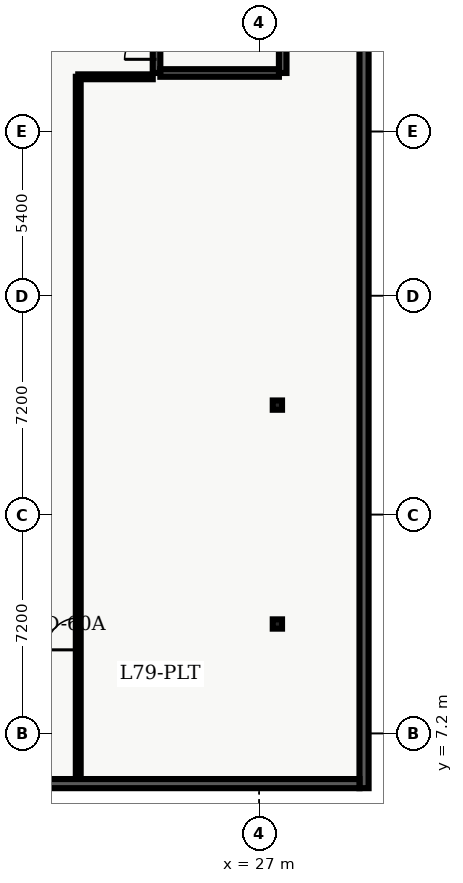
"""IFC4 building model, lengths in metres.
Left out: names, types, materials, properties, quantities, classifications, styles, units other than length and angle.
Written with IfcOpenShell. Run it as: python <this file> out.ifc"""

import sys

from ifc_helpers import new_model, entity, si_unit, converted_unit, direction, frame, origin_with_axes, origin_2d_with_axis, place, context, subcontext, project, spatial, polyline, rectangle, hollow_rectangle, outline, extrude, element, fill, save


model = new_model("IFC4")
c1 = context("Model", 3, precision=1e-05, world=origin_with_axes(), true_north=direction((0.0, 1.0)))
c2 = subcontext(c1, "Body", "Model", "MODEL_VIEW")
j1 = project(units=[si_unit("LENGTHUNIT", "METRE"), converted_unit("PLANEANGLEUNIT", "DEGREE", entity("IfcPlaneAngleMeasure", 0.017), si_unit("PLANEANGLEUNIT", "RADIAN"), dimensions=[0, 0, 0, 0, 0, 0, 0])], contexts=[c1])
p1 = place(None, origin_with_axes())
s1 = spatial("IfcSite", under=j1, at=p1, CompositionType="ELEMENT")
p2 = place(p1, origin_with_axes())
s2 = spatial("IfcBuilding", under=s1, at=p2, CompositionType="ELEMENT")
p3 = place(p2, frame((0.0, 0.0, 320.4), z_axis=(0.0, 0.0, 1.0), x_axis=(1.0, 0.0, 0.0)))
s3 = spatial("IfcBuildingStorey", under=s2, at=p3, CompositionType="ELEMENT", Elevation=320.4)
p4 = place(p3, frame((23.625, 28.925, 0.0), z_axis=(0.0, 0.0, 1.0), x_axis=(0.0, 1.0, 0.0)))
e1 = element("IfcWall", 1, at=p4, inside=s3, PredefinedType="SHEAR", context=c2, shape_type="SweptSolid", body=[
    extrude(outline(polyline([(0.0, -0.125), (8.65, -0.125), (8.65, 0.125), (0.0, 0.125), (0.0, -0.125)])), origin_with_axes(), (0.0, 0.0, 1.0), 3.64),
])
p5 = place(p4, frame((0.975, 0.0, 0.0), z_axis=(0.0, 0.0, 1.0), x_axis=(1.0, 0.0, 0.0)))
e2 = element("IfcOpeningElement", 2, at=p5, cuts=e1, PredefinedType="OPENING", context=c2, shape_type="SweptSolid", body=[
    extrude(rectangle(XDim=1.05, YDim=0.27, at=origin_2d_with_axis()), origin_with_axes(), (0.0, 0.0, 1.0), 2.15),
])
p6 = place(p3, frame((27.775, 28.925, 0.0), z_axis=(0.0, 0.0, 1.0), x_axis=(0.0, 1.0, 0.0)))
e3 = element("IfcWall", 3, at=p6, inside=s3, PredefinedType="SHEAR", context=c2, shape_type="SweptSolid", body=[
    extrude(outline(polyline([(0.0, -0.125), (8.65, -0.125), (8.65, 0.125), (0.0, 0.125), (0.0, -0.125)])), origin_with_axes(), (0.0, 0.0, 1.0), 3.64),
])
p7 = place(p3, frame((23.75, 28.925, 0.0), z_axis=(0.0, 0.0, 1.0), x_axis=(1.0, 0.0, 0.0)))
e4 = element("IfcWall", 4, at=p7, inside=s3, PredefinedType="SHEAR", context=c2, shape_type="SweptSolid", body=[
    extrude(outline(polyline([(0.0, -0.125), (3.9, -0.125), (3.9, 0.125), (0.0, 0.125), (0.0, -0.125)])), origin_with_axes(), (0.0, 0.0, 1.0), 3.64),
])
for number, where, z_axis, x_axis in (
    (5, (27.6, 10.8, 0.0), (0.0, 0.0, 1.0), (1.0, 0.0, 0.0)),
    (6, (27.6, 18.0, 0.0), (0.0, 0.0, 1.0), (1.0, 0.0, 0.0)),
):
    element("IfcColumn", number, at=place(p3, frame(where, z_axis=z_axis, x_axis=x_axis)), inside=s3, PredefinedType="COLUMN", context=c2, shape_type="SweptSolid", body=[
        extrude(hollow_rectangle(XDim=0.305, YDim=0.305, WallThickness=0.015, InnerFilletRadius=0.015, OuterFilletRadius=0.03, at=origin_2d_with_axis()), origin_with_axes(), (0.0, 0.0, 1.0), 3.9),
    ])
p8 = place(p3, frame((21.05, 5.695, 0.0), z_axis=(0.0, 0.0, 1.0), x_axis=(0.0, 1.0, 0.0)))
e7 = element("IfcWall", 7, at=p8, inside=s3, PredefinedType="PARTITIONING", context=c2, shape_type="SweptSolid", body=[
    extrude(outline(polyline([(0.0, -0.08), (23.105, -0.08), (23.105, 0.08), (0.0, 0.08), (0.0, -0.08)])), origin_with_axes(), (0.0, 0.0, 1.0), 2.68),
])
p9 = place(p8, frame((4.78, 0.0, 0.0), z_axis=(0.0, 0.0, 1.0), x_axis=(1.0, 0.0, 0.0)))
e8 = element("IfcOpeningElement", 8, at=p9, cuts=e7, PredefinedType="OPENING", context=c2, shape_type="SweptSolid", body=[
    extrude(rectangle(XDim=1.05, YDim=0.18, at=origin_2d_with_axis()), origin_with_axes(), (0.0, 0.0, 1.0), 2.15),
])
p10 = place(p3, frame((21.05, 28.8, 0.0), z_axis=(0.0, 0.0, 1.0), x_axis=(1.0, 0.0, 0.0)))
e9 = element("IfcWall", 9, at=p10, inside=s3, PredefinedType="PARTITIONING", context=c2, shape_type="SweptSolid", body=[
    extrude(outline(polyline([(0.0, -0.08), (2.45, -0.08), (2.45, 0.08), (0.0, 0.08), (0.0, -0.08)])), origin_with_axes(), (0.0, 0.0, 1.0), 2.68),
])
p11 = place(p3, frame((30.45, 31.0, 0.0), z_axis=(0.0, 0.0, 1.0), x_axis=(0.0, -1.0, 0.0)))
e10 = element("IfcWall", 10, at=p11, inside=s3, PredefinedType="SOLIDWALL", context=c2, shape_type="SweptSolid", body=[
    extrude(outline(polyline([(0.0, -0.15), (25.6, -0.15), (25.6, 0.15), (0.0, 0.15), (0.0, -0.15)])), origin_with_axes(), (0.0, 0.0, 1.0), 3.64),
])
p12 = place(p3, frame((30.3, 5.55, 0.0), z_axis=(0.0, 0.0, 1.0), x_axis=(-1.0, 0.0, 0.0)))
e11 = element("IfcWall", 11, at=p12, inside=s3, PredefinedType="SOLIDWALL", context=c2, shape_type="SweptSolid", body=[
    extrude(outline(polyline([(0.0, -0.15), (20.1, -0.15), (20.1, 0.15), (0.0, 0.15), (0.0, -0.15)])), origin_with_axes(), (0.0, 0.0, 1.0), 3.64),
])
p13 = place(p4, frame((0.975, 0.0, 0.0), z_axis=(0.0, 0.0, 1.0), x_axis=(1.0, 0.0, 0.0)))
e12 = element("IfcDoor", 12, at=p13, inside=s3, OperationType="SINGLE_SWING_LEFT", PredefinedType="DOOR", context=c2, shape_type="SweptSolid", body=[
    extrude(rectangle(XDim=1.05, YDim=0.09, at=origin_2d_with_axis()), origin_with_axes(), (0.0, 0.0, 1.0), 2.15),
])
fill(e2, e12)
p14 = place(p8, frame((4.78, 0.0, 0.0), z_axis=(0.0, 0.0, 1.0), x_axis=(1.0, 0.0, 0.0)))
e13 = element("IfcDoor", 13, at=p14, inside=s3, OperationType="SINGLE_SWING_LEFT", PredefinedType="DOOR", context=c2, shape_type="SweptSolid", body=[
    extrude(rectangle(XDim=1.05, YDim=0.09, at=origin_2d_with_axis()), origin_with_axes(), (0.0, 0.0, 1.0), 2.15),
])
fill(e8, e13)
save(model, sys.argv[1])
